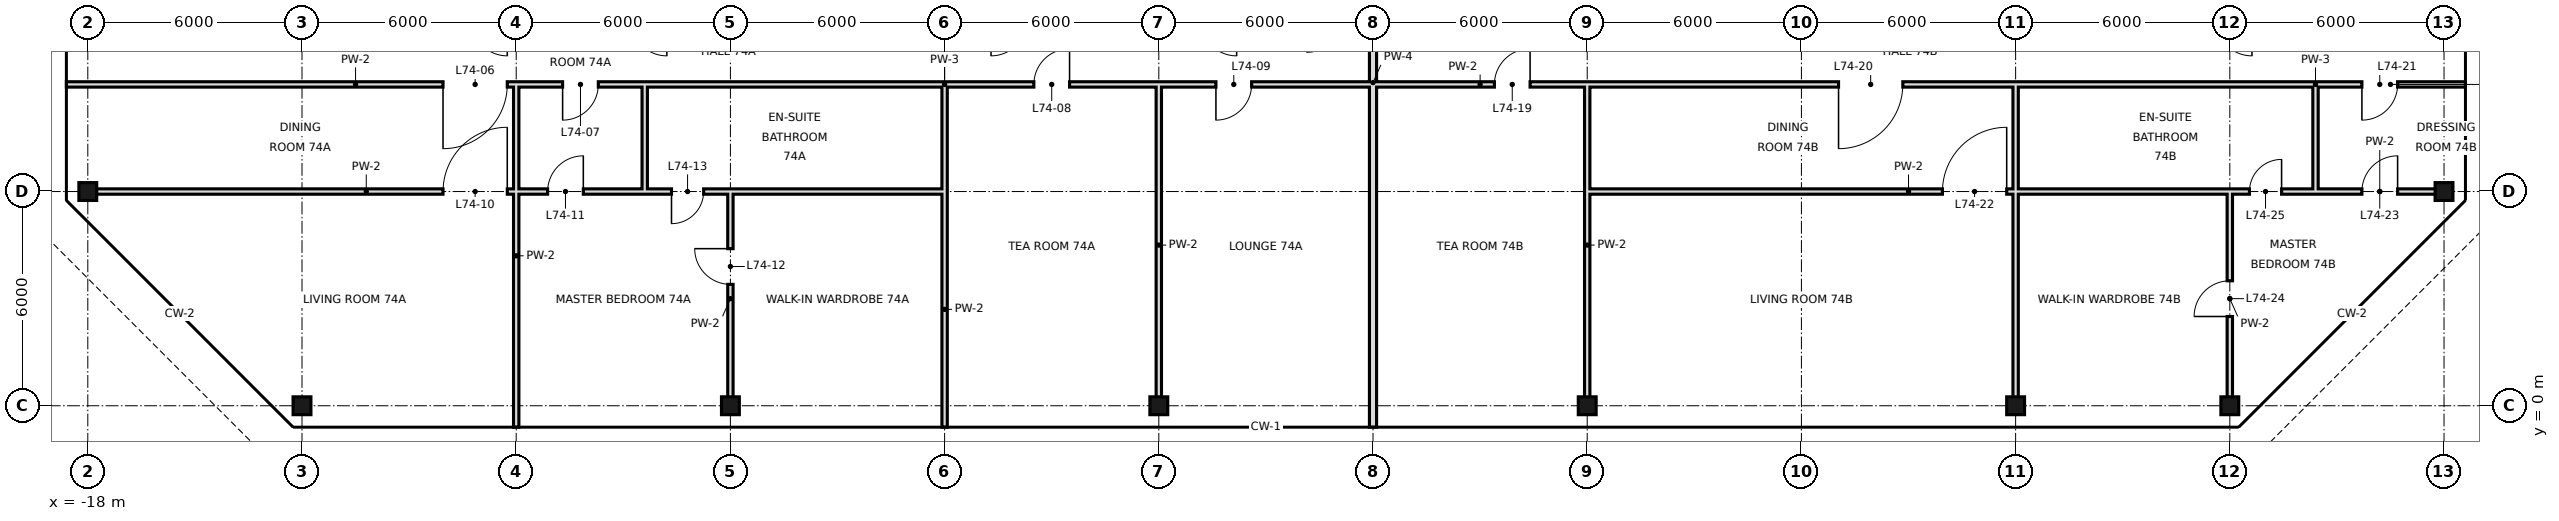
"""IFC4 building model, lengths in metres.
Left out: names, types, materials, properties, quantities, classifications, styles, units other than length and angle.
Written with IfcOpenShell. Run it as: python <this file> out.ifc"""

import sys

from ifc_helpers import new_model, si_unit, direction, frame, frame_2d, origin, origin_2d, place, context, subcontext, project, spatial, rectangle, hollow_rectangle, extrude, element, fill, save


model = new_model("IFC4")
c1 = context("Model", 3, precision=1e-05, world=origin(), true_north=direction((0.0, 1.0)))
c2 = subcontext(c1, "Body", "Model", "MODEL_VIEW")
j1 = project(units=[si_unit("LENGTHUNIT", "METRE"), si_unit("PLANEANGLEUNIT", "RADIAN")], contexts=[c1])
p1 = place(None, origin())
s1 = spatial("IfcSite", under=j1, at=p1, CompositionType="ELEMENT")
p2 = place(p1, origin())
s2 = spatial("IfcBuilding", under=s1, at=p2, CompositionType="ELEMENT")
p3 = place(p2, frame((0.0, 0.0, 312.4)))
s3 = spatial("IfcBuildingStorey", under=s2, at=p3, CompositionType="ELEMENT", Elevation=312.4)
for number, where, z_axis, x_axis in (
    (1, (-18.0, 6.0, 0.0), (0.0, 0.0, 1.0), (1.0, 0.0, 0.0)),
    (2, (-12.0, 0.0, 0.0), (0.0, 0.0, 1.0), (1.0, 0.0, 0.0)),
    (3, (0.0, 0.0, 0.0), (0.0, 0.0, 1.0), (1.0, 0.0, 0.0)),
    (4, (12.0, 0.0, 0.0), (0.0, 0.0, 1.0), (1.0, 0.0, 0.0)),
    (5, (24.0, 0.0, 0.0), (0.0, 0.0, 1.0), (1.0, 0.0, 0.0)),
    (6, (36.0, 0.0, 0.0), (0.0, 0.0, 1.0), (1.0, 0.0, 0.0)),
    (7, (42.0, 0.0, 0.0), (0.0, 0.0, 1.0), (1.0, 0.0, 0.0)),
    (8, (48.0, 6.0, 0.0), (0.0, 0.0, 1.0), (1.0, 0.0, 0.0)),
):
    element("IfcColumn", number, at=place(p3, frame(where, z_axis=z_axis, x_axis=x_axis)), inside=s3, PredefinedType="COLUMN", context=c2, shape_type="SweptSolid", body=[
        extrude(hollow_rectangle(XDim=0.5, YDim=0.5, WallThickness=0.025, at=origin_2d()), origin(), (0.0, 0.0, 1.0), 3.6),
    ])
p4 = place(p3, frame((-2.4, 6.0, 0.0), z_axis=(0.0, 0.0, 1.0), x_axis=(0.0, 1.0, 0.0)))
e9 = element("IfcWall", 9, at=p4, inside=s3, PredefinedType="PARTITIONING", context=c2, shape_type="SweptSolid", body=[
    extrude(rectangle(XDim=3.0, YDim=0.15, at=frame_2d((1.5, 0.0))), origin(), (0.0, 0.0, 1.0), 3.42),
])
p5 = place(p3, frame((-6.0, -0.6, 0.0), z_axis=(0.0, 0.0, 1.0), x_axis=(0.0, 1.0, 0.0)))
e10 = element("IfcWall", 10, at=p5, inside=s3, PredefinedType="PARTITIONING", context=c2, shape_type="SweptSolid", body=[
    extrude(rectangle(XDim=9.6, YDim=0.15, at=frame_2d((4.8, 0.0))), origin(), (0.0, 0.0, 1.0), 3.42),
])
p6 = place(p3, frame((0.0, 0.0, 0.0), z_axis=(0.0, 0.0, 1.0), x_axis=(0.0, 1.0, 0.0)))
e11 = element("IfcWall", 11, at=p6, inside=s3, PredefinedType="PARTITIONING", context=c2, shape_type="SweptSolid", body=[
    extrude(rectangle(XDim=6.0, YDim=0.15, at=frame_2d((3.0, 0.0))), origin(), (0.0, 0.0, 1.0), 2.72),
])
p7 = place(p6, frame((3.4, 0.0, 0.0)))
e12 = element("IfcOpeningElement", 12, at=p7, cuts=e11, PredefinedType="OPENING", context=c2, shape_type="SweptSolid", body=[
    extrude(rectangle(XDim=1.0, YDim=2.4, at=frame_2d((0.5, 1.2))), frame((0.0, 0.085, 0.0), z_axis=(0.0, -1.0, 0.0), x_axis=(1.0, 0.0, 0.0)), (0.0, 0.0, 1.0), 0.17),
])
p8 = place(p3, frame((12.0, 0.0, 0.0), z_axis=(0.0, 0.0, 1.0), x_axis=(0.0, 1.0, 0.0)))
e13 = element("IfcWall", 13, at=p8, inside=s3, PredefinedType="PARTITIONING", context=c2, shape_type="SweptSolid", body=[
    extrude(rectangle(XDim=9.0, YDim=0.15, at=frame_2d((4.5, 0.0))), origin(), (0.0, 0.0, 1.0), 2.72),
])
p9 = place(p3, frame((18.0, -0.6, 0.0), z_axis=(0.0, 0.0, 1.0), x_axis=(0.0, 1.0, 0.0)))
e14 = element("IfcWall", 14, at=p9, inside=s3, PredefinedType="SOLIDWALL", context=c2, shape_type="SweptSolid", body=[
    extrude(rectangle(XDim=19.3, YDim=0.2, at=frame_2d((9.65, 0.0))), origin(), (0.0, 0.0, 1.0), 2.72),
])
p10 = place(p3, frame((24.0, 0.0, 0.0), z_axis=(0.0, 0.0, 1.0), x_axis=(0.0, 1.0, 0.0)))
e15 = element("IfcWall", 15, at=p10, inside=s3, PredefinedType="PARTITIONING", context=c2, shape_type="SweptSolid", body=[
    extrude(rectangle(XDim=9.0, YDim=0.15, at=frame_2d((4.5, 0.0))), origin(), (0.0, 0.0, 1.0), 2.72),
])
p11 = place(p3, frame((36.0, 0.0, 0.0), z_axis=(0.0, 0.0, 1.0), x_axis=(0.0, 1.0, 0.0)))
e16 = element("IfcWall", 16, at=p11, inside=s3, PredefinedType="PARTITIONING", context=c2, shape_type="SweptSolid", body=[
    extrude(rectangle(XDim=6.0, YDim=0.15, at=frame_2d((3.0, 0.0))), origin(), (0.0, 0.0, 1.0), 2.72),
])
p12 = place(p3, frame((36.0, 6.0, 0.0), z_axis=(0.0, 0.0, 1.0), x_axis=(0.0, 1.0, 0.0)))
e17 = element("IfcWall", 17, at=p12, inside=s3, PredefinedType="PARTITIONING", context=c2, shape_type="SweptSolid", body=[
    extrude(rectangle(XDim=3.0, YDim=0.15, at=frame_2d((1.5, 0.0))), origin(), (0.0, 0.0, 1.0), 2.72),
])
p13 = place(p3, frame((42.0, 0.0, 0.0), z_axis=(0.0, 0.0, 1.0), x_axis=(0.0, 1.0, 0.0)))
e18 = element("IfcWall", 18, at=p13, inside=s3, PredefinedType="PARTITIONING", context=c2, shape_type="SweptSolid", body=[
    extrude(rectangle(XDim=6.0, YDim=0.15, at=frame_2d((3.0, 0.0))), origin(), (0.0, 0.0, 1.0), 2.72),
])
p14 = place(p13, frame((2.5, 0.0, 0.0)))
e19 = element("IfcOpeningElement", 19, at=p14, cuts=e18, PredefinedType="OPENING", context=c2, shape_type="SweptSolid", body=[
    extrude(rectangle(XDim=1.0, YDim=2.4, at=frame_2d((0.5, 1.2))), frame((0.0, 0.085, 0.0), z_axis=(0.0, -1.0, 0.0), x_axis=(1.0, 0.0, 0.0)), (0.0, 0.0, 1.0), 0.17),
])
p15 = place(p3, frame((44.4, 6.0, 0.0), z_axis=(0.0, 0.0, 1.0), x_axis=(0.0, 1.0, 0.0)))
e20 = element("IfcWall", 20, at=p15, inside=s3, PredefinedType="PARTITIONING", context=c2, shape_type="SweptSolid", body=[
    extrude(rectangle(XDim=3.0, YDim=0.15, at=frame_2d((1.5, 0.0))), origin(), (0.0, 0.0, 1.0), 3.42),
])
p16 = place(p3, frame((6.0, -0.6, 0.0), z_axis=(0.0, 0.0, 1.0), x_axis=(0.0, 1.0, 0.0)))
e21 = element("IfcWall", 21, at=p16, inside=s3, PredefinedType="PARTITIONING", context=c2, shape_type="SweptSolid", body=[
    extrude(rectangle(XDim=6.6, YDim=0.15, at=frame_2d((3.3, 0.0))), origin(), (0.0, 0.0, 1.0), 2.72),
])
p17 = place(p3, frame((6.0, 6.0, 0.0), z_axis=(0.0, 0.0, 1.0), x_axis=(0.0, 1.0, 0.0)))
e22 = element("IfcWall", 22, at=p17, inside=s3, PredefinedType="PARTITIONING", context=c2, shape_type="SweptSolid", body=[
    extrude(rectangle(XDim=3.0, YDim=0.15, at=frame_2d((1.5, 0.0))), origin(), (0.0, 0.0, 1.0), 2.72),
])
p18 = place(p3, frame((-18.0, 6.0, 0.0), z_axis=(0.0, 0.0, 1.0), x_axis=(1.0, 0.0, 0.0)))
e23 = element("IfcWall", 23, at=p18, inside=s3, PredefinedType="PARTITIONING", context=c2, shape_type="SweptSolid", body=[
    extrude(rectangle(XDim=15.6, YDim=0.15, at=frame_2d((7.8, 0.0))), origin(), (0.0, 0.0, 1.0), 2.72),
])
p19 = place(p18, frame((9.95, 0.0, 0.0)))
e24 = element("IfcOpeningElement", 24, at=p19, cuts=e23, PredefinedType="OPENING", context=c2, shape_type="SweptSolid", body=[
    extrude(rectangle(XDim=1.8, YDim=2.4, at=frame_2d((0.9, 1.2))), frame((0.0, 0.085, 0.0), z_axis=(0.0, -1.0, 0.0), x_axis=(1.0, 0.0, 0.0)), (0.0, 0.0, 1.0), 0.17),
])
p20 = place(p18, frame((12.88, 0.0, 0.0)))
e25 = element("IfcOpeningElement", 25, at=p20, cuts=e23, PredefinedType="OPENING", context=c2, shape_type="SweptSolid", body=[
    extrude(rectangle(XDim=1.0, YDim=2.4, at=frame_2d((0.5, 1.2))), frame((0.0, 0.085, 0.0), z_axis=(0.0, -1.0, 0.0), x_axis=(1.0, 0.0, 0.0)), (0.0, 0.0, 1.0), 0.17),
])
p21 = place(p3, frame((24.0, 6.0, 0.0), z_axis=(0.0, 0.0, 1.0), x_axis=(1.0, 0.0, 0.0)))
e26 = element("IfcWall", 26, at=p21, inside=s3, PredefinedType="PARTITIONING", context=c2, shape_type="SweptSolid", body=[
    extrude(rectangle(XDim=12.0, YDim=0.15, at=frame_2d((6.0, 0.0))), origin(), (0.0, 0.0, 1.0), 2.97),
])
p22 = place(p21, frame((9.95, 0.0, 0.0)))
e27 = element("IfcOpeningElement", 27, at=p22, cuts=e26, PredefinedType="OPENING", context=c2, shape_type="SweptSolid", body=[
    extrude(rectangle(XDim=1.8, YDim=2.4, at=frame_2d((0.9, 1.2))), frame((0.0, 0.085, 0.0), z_axis=(0.0, -1.0, 0.0), x_axis=(1.0, 0.0, 0.0)), (0.0, 0.0, 1.0), 0.17),
])
p23 = place(p3, frame((44.4, 6.0, 0.0), z_axis=(0.0, 0.0, 1.0), x_axis=(1.0, 0.0, 0.0)))
e28 = element("IfcWall", 28, at=p23, inside=s3, PredefinedType="PARTITIONING", context=c2, shape_type="SweptSolid", body=[
    extrude(rectangle(XDim=3.6, YDim=0.15, at=frame_2d((1.8, 0.0))), origin(), (0.0, 0.0, 1.0), 2.97),
])
p24 = place(p23, frame((1.3, 0.0, 0.0)))
e29 = element("IfcOpeningElement", 29, at=p24, cuts=e28, PredefinedType="OPENING", context=c2, shape_type="SweptSolid", body=[
    extrude(rectangle(XDim=1.0, YDim=2.4, at=frame_2d((0.5, 1.2))), frame((0.0, 0.085, 0.0), z_axis=(0.0, -1.0, 0.0), x_axis=(1.0, 0.0, 0.0)), (0.0, 0.0, 1.0), 0.17),
])
p25 = place(p3, frame((-2.4, 6.0, 0.0), z_axis=(0.0, 0.0, 1.0), x_axis=(1.0, 0.0, 0.0)))
e30 = element("IfcWall", 30, at=p25, inside=s3, PredefinedType="PARTITIONING", context=c2, shape_type="SweptSolid", body=[
    extrude(rectangle(XDim=8.4, YDim=0.15, at=frame_2d((4.2, 0.0))), origin(), (0.0, 0.0, 1.0), 2.72),
])
p26 = place(p25, frame((0.75, 0.0, 0.0)))
e31 = element("IfcOpeningElement", 31, at=p26, cuts=e30, PredefinedType="OPENING", context=c2, shape_type="SweptSolid", body=[
    extrude(rectangle(XDim=0.9, YDim=2.4, at=frame_2d((0.45, 1.2))), frame((0.0, 0.085, 0.0), z_axis=(0.0, -1.0, 0.0), x_axis=(1.0, 0.0, 0.0)), (0.0, 0.0, 1.0), 0.17),
])
p27 = place(p3, frame((36.0, 6.0, 0.0), z_axis=(0.0, 0.0, 1.0), x_axis=(1.0, 0.0, 0.0)))
e32 = element("IfcWall", 32, at=p27, inside=s3, PredefinedType="PARTITIONING", context=c2, shape_type="SweptSolid", body=[
    extrude(rectangle(XDim=8.4, YDim=0.15, at=frame_2d((4.2, 0.0))), origin(), (0.0, 0.0, 1.0), 2.97),
])
p28 = place(p27, frame((6.55, 0.0, 0.0)))
e33 = element("IfcOpeningElement", 33, at=p28, cuts=e32, PredefinedType="OPENING", context=c2, shape_type="SweptSolid", body=[
    extrude(rectangle(XDim=0.9, YDim=2.4, at=frame_2d((0.45, 1.2))), frame((0.0, 0.085, 0.0), z_axis=(0.0, -1.0, 0.0), x_axis=(1.0, 0.0, 0.0)), (0.0, 0.0, 1.0), 0.17),
])
p29 = place(p3, frame((-18.6, 9.0, 0.0), z_axis=(0.0, 0.0, 1.0), x_axis=(1.0, 0.0, 0.0)))
e34 = element("IfcWall", 34, at=p29, inside=s3, PredefinedType="PARTITIONING", context=c2, shape_type="SweptSolid", body=[
    extrude(rectangle(XDim=16.2, YDim=0.15, at=frame_2d((8.1, 0.0))), origin(), (0.0, 0.0, 1.0), 3.42),
])
p30 = place(p29, frame((10.55, 0.0, 0.0)))
e35 = element("IfcOpeningElement", 35, at=p30, cuts=e34, PredefinedType="OPENING", context=c2, shape_type="SweptSolid", body=[
    extrude(rectangle(XDim=1.8, YDim=2.4, at=frame_2d((0.9, 1.2))), frame((0.0, 0.085, 0.0), z_axis=(0.0, -1.0, 0.0), x_axis=(1.0, 0.0, 0.0)), (0.0, 0.0, 1.0), 0.17),
])
p31 = place(p29, frame((13.9, 0.0, 0.0)))
e36 = element("IfcOpeningElement", 36, at=p31, cuts=e34, PredefinedType="OPENING", context=c2, shape_type="SweptSolid", body=[
    extrude(rectangle(XDim=1.0, YDim=2.4, at=frame_2d((0.5, 1.2))), frame((0.0, 0.085, 0.0), z_axis=(0.0, -1.0, 0.0), x_axis=(1.0, 0.0, 0.0)), (0.0, 0.0, 1.0), 0.17),
])
p32 = place(p3, frame((6.0, 9.0, 0.0), z_axis=(0.0, 0.0, 1.0), x_axis=(1.0, 0.0, 0.0)))
e37 = element("IfcWall", 37, at=p32, inside=s3, PredefinedType="PARTITIONING", context=c2, shape_type="SweptSolid", body=[
    extrude(rectangle(XDim=30.0, YDim=0.15, at=frame_2d((15.0, 0.0))), origin(), (0.0, 0.0, 1.0), 3.42),
])
p33 = place(p32, frame((2.5, 0.0, 0.0)))
e38 = element("IfcOpeningElement", 38, at=p33, cuts=e37, PredefinedType="OPENING", context=c2, shape_type="SweptSolid", body=[
    extrude(rectangle(XDim=1.0, YDim=2.4, at=frame_2d((0.5, 1.2))), frame((0.0, 0.085, 0.0), z_axis=(0.0, -1.0, 0.0), x_axis=(1.0, 0.0, 0.0)), (0.0, 0.0, 1.0), 0.17),
])
p34 = place(p32, frame((7.6, 0.0, 0.0)))
e39 = element("IfcOpeningElement", 39, at=p34, cuts=e37, PredefinedType="OPENING", context=c2, shape_type="SweptSolid", body=[
    extrude(rectangle(XDim=1.0, YDim=2.4, at=frame_2d((0.5, 1.2))), frame((0.0, 0.085, 0.0), z_axis=(0.0, -1.0, 0.0), x_axis=(1.0, 0.0, 0.0)), (0.0, 0.0, 1.0), 0.17),
])
p35 = place(p32, frame((15.4, 0.0, 0.0)))
e40 = element("IfcOpeningElement", 40, at=p35, cuts=e37, PredefinedType="OPENING", context=c2, shape_type="SweptSolid", body=[
    extrude(rectangle(XDim=1.0, YDim=2.4, at=frame_2d((0.5, 1.2))), frame((0.0, 0.085, 0.0), z_axis=(0.0, -1.0, 0.0), x_axis=(1.0, 0.0, 0.0)), (0.0, 0.0, 1.0), 0.17),
])
p36 = place(p32, frame((25.04, 0.0, 0.0)))
e41 = element("IfcOpeningElement", 41, at=p36, cuts=e37, PredefinedType="OPENING", context=c2, shape_type="SweptSolid", body=[
    extrude(rectangle(XDim=1.8, YDim=2.4, at=frame_2d((0.9, 1.2))), frame((0.0, 0.085, 0.0), z_axis=(0.0, -1.0, 0.0), x_axis=(1.0, 0.0, 0.0)), (0.0, 0.0, 1.0), 0.17),
])
p37 = place(p3, frame((44.4, 9.0, 0.0), z_axis=(0.0, 0.0, 1.0), x_axis=(1.0, 0.0, 0.0)))
e42 = element("IfcWall", 42, at=p37, inside=s3, PredefinedType="PARTITIONING", context=c2, shape_type="SweptSolid", body=[
    extrude(rectangle(XDim=4.2, YDim=0.15, at=frame_2d((2.1, 0.0))), origin(), (0.0, 0.0, 1.0), 3.42),
])
p38 = place(p37, frame((1.3, 0.0, 0.0)))
e43 = element("IfcOpeningElement", 43, at=p38, cuts=e42, PredefinedType="OPENING", context=c2, shape_type="SweptSolid", body=[
    extrude(rectangle(XDim=1.0, YDim=2.4, at=frame_2d((0.5, 1.2))), frame((0.0, 0.085, 0.0), z_axis=(0.0, -1.0, 0.0), x_axis=(1.0, 0.0, 0.0)), (0.0, 0.0, 1.0), 0.17),
])
for number, where, z_axis, x_axis in (
    (44, (-2.4, 9.0, 0.0), (0.0, 0.0, 1.0), (1.0, 0.0, 0.0)),
    (45, (36.0, 9.0, 0.0), (0.0, 0.0, 1.0), (1.0, 0.0, 0.0)),
):
    element("IfcWall", number, at=place(p3, frame(where, z_axis=z_axis, x_axis=x_axis)), inside=s3, PredefinedType="PARTITIONING", context=c2, shape_type="SweptSolid", body=[
        extrude(rectangle(XDim=8.4, YDim=0.15, at=frame_2d((4.2, 0.0))), origin(), (0.0, 0.0, 1.0), 3.42),
    ])
p39 = place(p30, frame((1.8, 0.0, 0.0), z_axis=(0.0, 0.0, 1.0), x_axis=(-1.0, 0.0, 0.0)))
e46 = element("IfcDoor", 46, at=p39, inside=s3, OperationType="SINGLE_SWING_RIGHT", PredefinedType="DOOR", context=c2, shape_type="SweptSolid", body=[
    extrude(rectangle(XDim=1.8, YDim=2.4, at=frame_2d((0.9, 1.2))), frame((0.0, 0.025, 0.0), z_axis=(0.0, -1.0, 0.0), x_axis=(1.0, 0.0, 0.0)), (0.0, 0.0, 1.0), 0.05),
])
fill(e35, e46)
p40 = place(p31, frame((1.0, 0.0, 0.0), z_axis=(0.0, 0.0, 1.0), x_axis=(-1.0, 0.0, 0.0)))
e47 = element("IfcDoor", 47, at=p40, inside=s3, OperationType="SINGLE_SWING_RIGHT", PredefinedType="DOOR", context=c2, shape_type="SweptSolid", body=[
    extrude(rectangle(XDim=1.0, YDim=2.4, at=frame_2d((0.5, 1.2))), frame((0.0, 0.025, 0.0), z_axis=(0.0, -1.0, 0.0), x_axis=(1.0, 0.0, 0.0)), (0.0, 0.0, 1.0), 0.05),
])
fill(e36, e47)
p41 = place(p33, frame((1.0, 0.0, 0.0), z_axis=(0.0, 0.0, 1.0), x_axis=(-1.0, 0.0, 0.0)))
e48 = element("IfcDoor", 48, at=p41, inside=s3, OperationType="SINGLE_SWING_LEFT", PredefinedType="DOOR", context=c2, shape_type="SweptSolid", body=[
    extrude(rectangle(XDim=1.0, YDim=2.4, at=frame_2d((0.5, 1.2))), frame((0.0, 0.025, 0.0), z_axis=(0.0, -1.0, 0.0), x_axis=(1.0, 0.0, 0.0)), (0.0, 0.0, 1.0), 0.05),
])
fill(e38, e48)
p42 = place(p34, frame((1.0, 0.0, 0.0), z_axis=(0.0, 0.0, 1.0), x_axis=(-1.0, 0.0, 0.0)))
e49 = element("IfcDoor", 49, at=p42, inside=s3, OperationType="SINGLE_SWING_RIGHT", PredefinedType="DOOR", context=c2, shape_type="SweptSolid", body=[
    extrude(rectangle(XDim=1.0, YDim=2.4, at=frame_2d((0.5, 1.2))), frame((0.0, 0.025, 0.0), z_axis=(0.0, -1.0, 0.0), x_axis=(1.0, 0.0, 0.0)), (0.0, 0.0, 1.0), 0.05),
])
fill(e39, e49)
p43 = place(p19, frame((1.8, 0.0, 0.0), z_axis=(0.0, 0.0, 1.0), x_axis=(-1.0, 0.0, 0.0)))
e50 = element("IfcDoor", 50, at=p43, inside=s3, OperationType="SINGLE_SWING_LEFT", PredefinedType="DOOR", context=c2, shape_type="SweptSolid", body=[
    extrude(rectangle(XDim=1.8, YDim=2.4, at=frame_2d((0.9, 1.2))), frame((0.0, 0.025, 0.0), z_axis=(0.0, -1.0, 0.0), x_axis=(1.0, 0.0, 0.0)), (0.0, 0.0, 1.0), 0.05),
])
fill(e24, e50)
p44 = place(p20, frame((1.0, 0.0, 0.0), z_axis=(0.0, 0.0, 1.0), x_axis=(-1.0, 0.0, 0.0)))
e51 = element("IfcDoor", 51, at=p44, inside=s3, OperationType="SINGLE_SWING_LEFT", PredefinedType="DOOR", context=c2, shape_type="SweptSolid", body=[
    extrude(rectangle(XDim=1.0, YDim=2.4, at=frame_2d((0.5, 1.2))), frame((0.0, 0.025, 0.0), z_axis=(0.0, -1.0, 0.0), x_axis=(1.0, 0.0, 0.0)), (0.0, 0.0, 1.0), 0.05),
])
fill(e25, e51)
p45 = place(p7, frame((1.0, 0.0, 0.0), z_axis=(0.0, 0.0, 1.0), x_axis=(-1.0, 0.0, 0.0)))
e52 = element("IfcDoor", 52, at=p45, inside=s3, OperationType="SINGLE_SWING_LEFT", PredefinedType="DOOR", context=c2, shape_type="SweptSolid", body=[
    extrude(rectangle(XDim=1.0, YDim=2.4, at=frame_2d((0.5, 1.2))), frame((0.0, 0.025, 0.0), z_axis=(0.0, -1.0, 0.0), x_axis=(1.0, 0.0, 0.0)), (0.0, 0.0, 1.0), 0.05),
])
fill(e12, e52)
p46 = place(p26, frame((0.9, 0.0, 0.0), z_axis=(0.0, 0.0, 1.0), x_axis=(-1.0, 0.0, 0.0)))
e53 = element("IfcDoor", 53, at=p46, inside=s3, OperationType="SINGLE_SWING_RIGHT", PredefinedType="DOOR", context=c2, shape_type="SweptSolid", body=[
    extrude(rectangle(XDim=0.9, YDim=2.4, at=frame_2d((0.45, 1.2))), frame((0.0, 0.025, 0.0), z_axis=(0.0, -1.0, 0.0), x_axis=(1.0, 0.0, 0.0)), (0.0, 0.0, 1.0), 0.05),
])
fill(e31, e53)
p47 = place(p35, frame((1.0, 0.0, 0.0), z_axis=(0.0, 0.0, 1.0), x_axis=(-1.0, 0.0, 0.0)))
e54 = element("IfcDoor", 54, at=p47, inside=s3, OperationType="SINGLE_SWING_LEFT", PredefinedType="DOOR", context=c2, shape_type="SweptSolid", body=[
    extrude(rectangle(XDim=1.0, YDim=2.4, at=frame_2d((0.5, 1.2))), frame((0.0, 0.025, 0.0), z_axis=(0.0, -1.0, 0.0), x_axis=(1.0, 0.0, 0.0)), (0.0, 0.0, 1.0), 0.05),
])
fill(e40, e54)
p48 = place(p36, frame((1.8, 0.0, 0.0), z_axis=(0.0, 0.0, 1.0), x_axis=(-1.0, 0.0, 0.0)))
e55 = element("IfcDoor", 55, at=p48, inside=s3, OperationType="SINGLE_SWING_RIGHT", PredefinedType="DOOR", context=c2, shape_type="SweptSolid", body=[
    extrude(rectangle(XDim=1.8, YDim=2.4, at=frame_2d((0.9, 1.2))), frame((0.0, 0.025, 0.0), z_axis=(0.0, -1.0, 0.0), x_axis=(1.0, 0.0, 0.0)), (0.0, 0.0, 1.0), 0.05),
])
fill(e41, e55)
p49 = place(p38, frame((1.0, 0.0, 0.0), z_axis=(0.0, 0.0, 1.0), x_axis=(-1.0, 0.0, 0.0)))
e56 = element("IfcDoor", 56, at=p49, inside=s3, OperationType="SINGLE_SWING_RIGHT", PredefinedType="DOOR", context=c2, shape_type="SweptSolid", body=[
    extrude(rectangle(XDim=1.0, YDim=2.4, at=frame_2d((0.5, 1.2))), frame((0.0, 0.025, 0.0), z_axis=(0.0, -1.0, 0.0), x_axis=(1.0, 0.0, 0.0)), (0.0, 0.0, 1.0), 0.05),
])
fill(e43, e56)
p50 = place(p22, frame((1.8, 0.0, 0.0), z_axis=(0.0, 0.0, 1.0), x_axis=(-1.0, 0.0, 0.0)))
e57 = element("IfcDoor", 57, at=p50, inside=s3, OperationType="SINGLE_SWING_LEFT", PredefinedType="DOOR", context=c2, shape_type="SweptSolid", body=[
    extrude(rectangle(XDim=1.8, YDim=2.4, at=frame_2d((0.9, 1.2))), frame((0.0, 0.025, 0.0), z_axis=(0.0, -1.0, 0.0), x_axis=(1.0, 0.0, 0.0)), (0.0, 0.0, 1.0), 0.05),
])
fill(e27, e57)
p51 = place(p24, frame((1.0, 0.0, 0.0), z_axis=(0.0, 0.0, 1.0), x_axis=(-1.0, 0.0, 0.0)))
e58 = element("IfcDoor", 58, at=p51, inside=s3, OperationType="SINGLE_SWING_LEFT", PredefinedType="DOOR", context=c2, shape_type="SweptSolid", body=[
    extrude(rectangle(XDim=1.0, YDim=2.4, at=frame_2d((0.5, 1.2))), frame((0.0, 0.025, 0.0), z_axis=(0.0, -1.0, 0.0), x_axis=(1.0, 0.0, 0.0)), (0.0, 0.0, 1.0), 0.05),
])
fill(e29, e58)
p52 = place(p14, origin())
e59 = element("IfcDoor", 59, at=p52, inside=s3, OperationType="SINGLE_SWING_LEFT", PredefinedType="DOOR", context=c2, shape_type="SweptSolid", body=[
    extrude(rectangle(XDim=1.0, YDim=2.4, at=frame_2d((0.5, 1.2))), frame((0.0, 0.025, 0.0), z_axis=(0.0, -1.0, 0.0), x_axis=(1.0, 0.0, 0.0)), (0.0, 0.0, 1.0), 0.05),
])
fill(e19, e59)
p53 = place(p28, frame((0.9, 0.0, 0.0), z_axis=(0.0, 0.0, 1.0), x_axis=(-1.0, 0.0, 0.0)))
e60 = element("IfcDoor", 60, at=p53, inside=s3, OperationType="SINGLE_SWING_LEFT", PredefinedType="DOOR", context=c2, shape_type="SweptSolid", body=[
    extrude(rectangle(XDim=0.9, YDim=2.4, at=frame_2d((0.45, 1.2))), frame((0.0, 0.025, 0.0), z_axis=(0.0, -1.0, 0.0), x_axis=(1.0, 0.0, 0.0)), (0.0, 0.0, 1.0), 0.05),
])
fill(e33, e60)
save(model, sys.argv[1])
